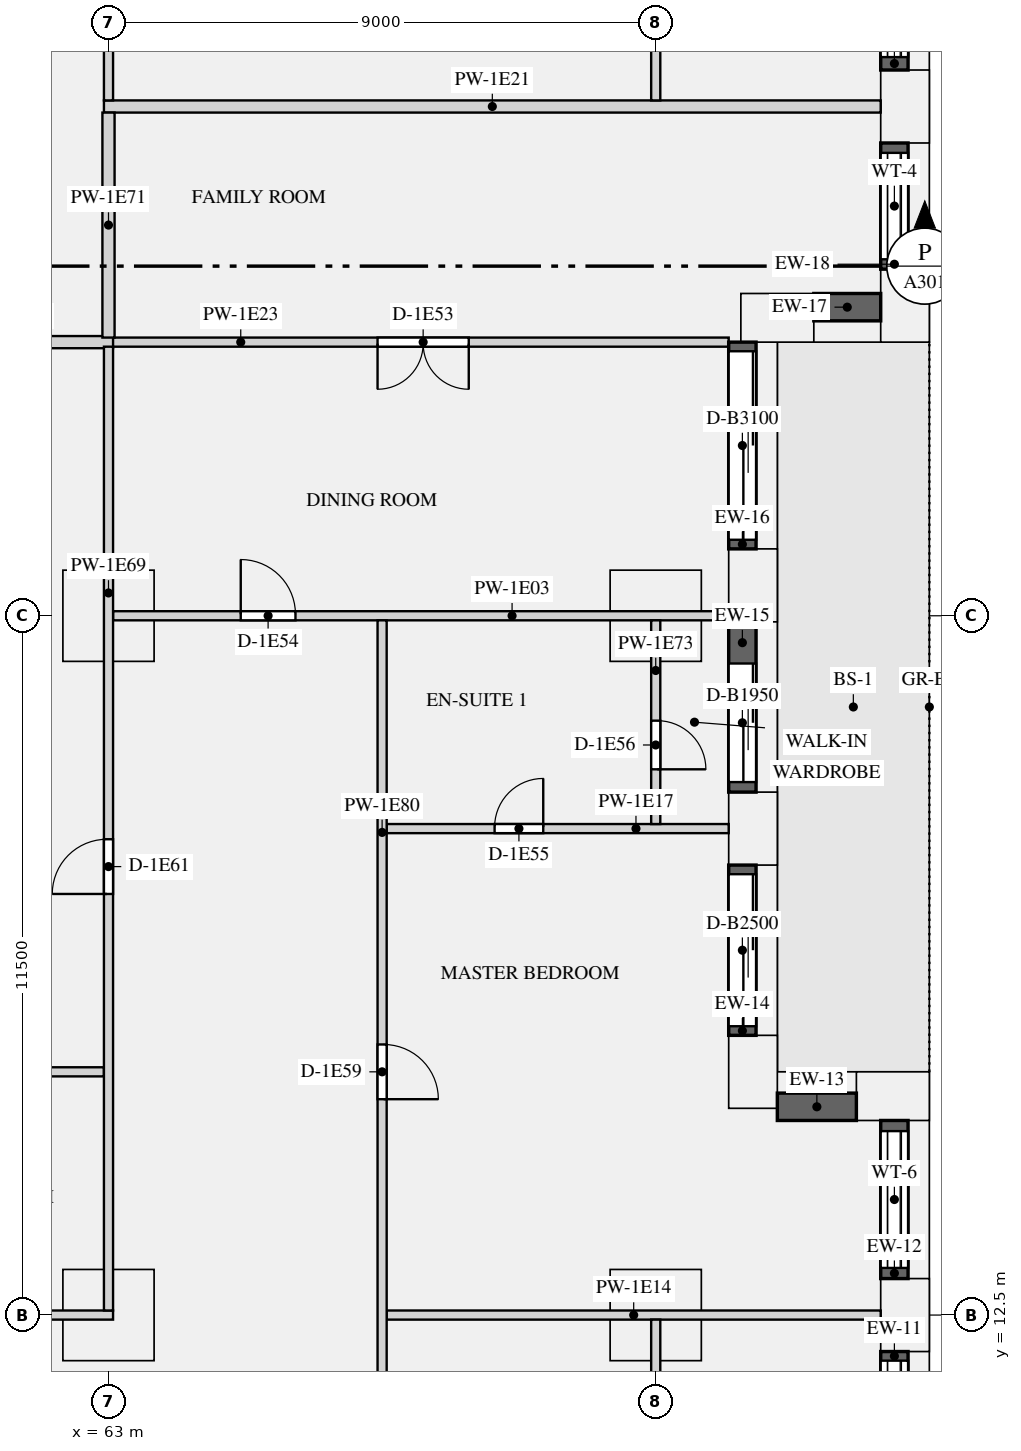
"""IFC4 building model, lengths in metres.
Left out: names, types, materials, properties, quantities, classifications, styles, units other than length and angle.
Written with IfcOpenShell. Run it as: python <this file> out.ifc"""

import sys

from ifc_helpers import new_model, si_unit, direction, frame, frame_2d, origin, origin_2d, place, context, subcontext, project, spatial, rectangle, extrude, element, fill, save


model = new_model("IFC4")
c1 = context("Model", 3, precision=1e-05, world=origin(), true_north=direction((0.0, 1.0)))
c2 = subcontext(c1, "Body", "Model", "MODEL_VIEW")
j1 = project(units=[si_unit("LENGTHUNIT", "METRE"), si_unit("PLANEANGLEUNIT", "RADIAN")], contexts=[c1])
p1 = place(None, origin())
s1 = spatial("IfcSite", under=j1, at=p1, CompositionType="ELEMENT")
p2 = place(p1, origin())
s2 = spatial("IfcBuilding", under=s1, at=p2, CompositionType="ELEMENT")
p3 = place(p2, frame((0.0, 0.0, 54.15)))
s3 = spatial("IfcBuildingStorey", under=s2, at=p3, CompositionType="ELEMENT", Elevation=54.15)
for number, where, z_axis, x_axis in (
    (1, (76.1, 12.5, 0.0), (0.0, 0.0, 1.0), (0.0, 1.0, 0.0)),
    (2, (75.9, 16.1, 0.0), (0.0, 0.0, 1.0), (-1.0, 0.0, 0.0)),
    (3, (73.6, 16.5, 0.0), (0.0, 0.0, 1.0), (0.0, 1.0, 0.0)),
    (4, (73.6, 20.5, 0.0), (0.0, 0.0, 1.0), (0.0, 1.0, 0.0)),
    (5, (73.6, 24.5, 0.0), (0.0, 0.0, 1.0), (0.0, 1.0, 0.0)),
    (6, (74.0, 28.9, 0.0), (0.0, 0.0, 1.0), (1.0, 0.0, 0.0)),
    (7, (76.1, 29.1, 0.0), (0.0, 0.0, 1.0), (0.0, 1.0, 0.0)),
    (8, (76.1, 32.375, 0.0), (0.0, 0.0, 1.0), (0.0, 1.0, 0.0)),
):
    element("IfcColumn", number, at=place(p3, frame(where, z_axis=z_axis, x_axis=x_axis)), inside=s3, PredefinedType="USERDEFINED", context=c2, shape_type="SweptSolid", body=[
        extrude(rectangle(XDim=1.2, YDim=0.8, at=origin_2d()), origin(), (0.0, 0.0, 1.0), 3.15),
    ])
for number, where, z_axis, x_axis in (
    (9, (63.0, 24.0, 0.0), (0.0, 0.0, 1.0), (1.0, 0.0, 0.0)),
    (10, (72.0, 24.0, 0.0), (0.0, 0.0, 1.0), (1.0, 0.0, 0.0)),
    (11, (63.0, 12.5, 0.0), (0.0, 0.0, 1.0), (1.0, 0.0, 0.0)),
    (12, (72.0, 12.5, 0.0), (0.0, 0.0, 1.0), (1.0, 0.0, 0.0)),
):
    element("IfcColumn", number, at=place(p3, frame(where, z_axis=z_axis, x_axis=x_axis)), inside=s3, PredefinedType="COLUMN", context=c2, shape_type="SweptSolid", body=[
        extrude(rectangle(XDim=1.5, YDim=1.5, at=origin_2d()), origin(), (0.0, 0.0, 1.0), 3.15),
    ])
p4 = place(p3, frame((75.925, 9.1, 0.9), z_axis=(0.0, 0.0, 1.0), x_axis=(0.0, 1.0, 0.0)))
e13 = element("IfcWall", 13, at=p4, inside=s3, PredefinedType="SOLIDWALL", context=c2, shape_type="SweptSolid", body=[
    extrude(rectangle(XDim=2.8, YDim=0.45, at=frame_2d((1.4, 0.0))), origin(), (0.0, 0.0, 1.0), 1.93),
])
p5 = place(p4, frame((0.15, 0.0, 0.15)))
e14 = element("IfcOpeningElement", 14, at=p5, cuts=e13, PredefinedType="OPENING", context=c2, shape_type="SweptSolid", body=[
    extrude(rectangle(XDim=2.5, YDim=1.5, at=frame_2d((1.25, 0.75))), frame((0.0, 0.235, 0.0), z_axis=(0.0, -1.0, 0.0), x_axis=(1.0, 0.0, 0.0)), (0.0, 0.0, 1.0), 0.47),
])
p6 = place(p3, frame((75.925, 13.1, 0.9), z_axis=(0.0, 0.0, 1.0), x_axis=(0.0, 1.0, 0.0)))
e15 = element("IfcWall", 15, at=p6, inside=s3, PredefinedType="SOLIDWALL", context=c2, shape_type="SweptSolid", body=[
    extrude(rectangle(XDim=2.6, YDim=0.45, at=frame_2d((1.3, 0.0))), origin(), (0.0, 0.0, 1.0), 1.93),
])
p7 = place(p6, frame((0.175, 0.0, 0.15)))
e16 = element("IfcOpeningElement", 16, at=p7, cuts=e15, PredefinedType="OPENING", context=c2, shape_type="SweptSolid", body=[
    extrude(rectangle(XDim=2.25, YDim=1.5, at=frame_2d((1.125, 0.75))), frame((0.0, 0.235, 0.0), z_axis=(0.0, -1.0, 0.0), x_axis=(1.0, 0.0, 0.0)), (0.0, 0.0, 1.0), 0.47),
])
p8 = place(p3, frame((75.3, 15.925, 0.9), z_axis=(0.0, 0.0, 1.0), x_axis=(-1.0, 0.0, 0.0)))
e17 = element("IfcWall", 17, at=p8, inside=s3, PredefinedType="SOLIDWALL", context=c2, shape_type="SweptSolid", body=[
    extrude(rectangle(XDim=1.3, YDim=0.45, at=frame_2d((0.65, 0.0))), origin(), (0.0, 0.0, 1.0), 1.93),
])
p9 = place(p3, frame((73.425, 17.1, 0.0), z_axis=(0.0, 0.0, 1.0), x_axis=(0.0, 1.0, 0.0)))
e18 = element("IfcWall", 18, at=p9, inside=s3, PredefinedType="SOLIDWALL", context=c2, shape_type="SweptSolid", body=[
    extrude(rectangle(XDim=2.8, YDim=0.45, at=frame_2d((1.4, 0.0))), origin(), (0.0, 0.0, 1.0), 2.83),
])
p10 = place(p9, frame((0.15, 0.0, 0.0)))
e19 = element("IfcOpeningElement", 19, at=p10, cuts=e18, PredefinedType="OPENING", context=c2, shape_type="SweptSolid", body=[
    extrude(rectangle(XDim=2.5, YDim=2.3, at=frame_2d((1.25, 1.15))), frame((0.0, 0.235, 0.0), z_axis=(0.0, -1.0, 0.0), x_axis=(1.0, 0.0, 0.0)), (0.0, 0.0, 1.0), 0.47),
])
p11 = place(p3, frame((73.425, 21.1, 0.0), z_axis=(0.0, 0.0, 1.0), x_axis=(0.0, 1.0, 0.0)))
e20 = element("IfcWall", 20, at=p11, inside=s3, PredefinedType="SOLIDWALL", context=c2, shape_type="SweptSolid", body=[
    extrude(rectangle(XDim=2.8, YDim=0.45, at=frame_2d((1.4, 0.0))), origin(), (0.0, 0.0, 1.0), 2.83),
])
p12 = place(p11, frame((0.165, 0.0, 0.0)))
e21 = element("IfcOpeningElement", 21, at=p12, cuts=e20, PredefinedType="OPENING", context=c2, shape_type="SweptSolid", body=[
    extrude(rectangle(XDim=1.95, YDim=2.3, at=frame_2d((0.975, 1.15))), frame((0.0, 0.235, 0.0), z_axis=(0.0, -1.0, 0.0), x_axis=(1.0, 0.0, 0.0)), (0.0, 0.0, 1.0), 0.47),
])
p13 = place(p3, frame((73.425, 25.1, 0.0), z_axis=(0.0, 0.0, 1.0), x_axis=(0.0, 1.0, 0.0)))
e22 = element("IfcWall", 22, at=p13, inside=s3, PredefinedType="SOLIDWALL", context=c2, shape_type="SweptSolid", body=[
    extrude(rectangle(XDim=3.4, YDim=0.45, at=frame_2d((1.7, 0.0))), origin(), (0.0, 0.0, 1.0), 2.83),
])
p14 = place(p13, frame((0.15, 0.0, 0.0)))
e23 = element("IfcOpeningElement", 23, at=p14, cuts=e22, PredefinedType="OPENING", context=c2, shape_type="SweptSolid", body=[
    extrude(rectangle(XDim=3.1, YDim=2.3, at=frame_2d((1.55, 1.15))), frame((0.0, 0.235, 0.0), z_axis=(0.0, -1.0, 0.0), x_axis=(1.0, 0.0, 0.0)), (0.0, 0.0, 1.0), 0.47),
])
p15 = place(p3, frame((74.6, 29.075, 0.9), z_axis=(0.0, 0.0, 1.0), x_axis=(1.0, 0.0, 0.0)))
e24 = element("IfcWall", 24, at=p15, inside=s3, PredefinedType="SOLIDWALL", context=c2, shape_type="SweptSolid", body=[
    extrude(rectangle(XDim=1.1, YDim=0.45, at=frame_2d((0.55, 0.0))), origin(), (0.0, 0.0, 1.0), 1.93),
])
p16 = place(p3, frame((75.925, 29.7, 0.9), z_axis=(0.0, 0.0, 1.0), x_axis=(0.0, 1.0, 0.0)))
e25 = element("IfcWall", 25, at=p16, inside=s3, PredefinedType="SOLIDWALL", context=c2, shape_type="SweptSolid", body=[
    extrude(rectangle(XDim=2.075, YDim=0.45, at=frame_2d((1.038, 0.0))), origin(), (0.0, 0.0, 1.0), 1.93),
])
p17 = place(p16, frame((0.163, 0.0, 0.15)))
e26 = element("IfcOpeningElement", 26, at=p17, cuts=e25, PredefinedType="OPENING", context=c2, shape_type="SweptSolid", body=[
    extrude(rectangle(XDim=1.75, YDim=1.5, at=frame_2d((0.875, 0.75))), frame((0.0, 0.235, 0.0), z_axis=(0.0, -1.0, 0.0), x_axis=(1.0, 0.0, 0.0)), (0.0, 0.0, 1.0), 0.47),
])
p18 = place(p3, frame((75.925, 32.975, 0.9), z_axis=(0.0, 0.0, 1.0), x_axis=(0.0, 1.0, 0.0)))
e27 = element("IfcWall", 27, at=p18, inside=s3, PredefinedType="SOLIDWALL", context=c2, shape_type="SweptSolid", body=[
    extrude(rectangle(XDim=2.675, YDim=0.45, at=frame_2d((1.337, 0.0))), origin(), (0.0, 0.0, 1.0), 1.93),
])
p19 = place(p18, frame((0.212, 0.0, 0.15)))
e28 = element("IfcOpeningElement", 28, at=p19, cuts=e27, PredefinedType="OPENING", context=c2, shape_type="SweptSolid", body=[
    extrude(rectangle(XDim=2.25, YDim=1.5, at=frame_2d((1.125, 0.75))), frame((0.0, 0.235, 0.0), z_axis=(0.0, -1.0, 0.0), x_axis=(1.0, 0.0, 0.0)), (0.0, 0.0, 1.0), 0.47),
])
p20 = place(p3, frame((63.075, 24.0, 0.0), z_axis=(0.0, 0.0, 1.0), x_axis=(1.0, 0.0, 0.0)))
e29 = element("IfcWall", 29, at=p20, inside=s3, PredefinedType="PARTITIONING", context=c2, shape_type="SweptSolid", body=[
    extrude(rectangle(XDim=10.125, YDim=0.15, at=frame_2d((5.062, 0.0))), origin(), (0.0, 0.0, 1.0), 2.83),
])
p21 = place(p20, frame((2.1, 0.0, 0.0)))
e30 = element("IfcOpeningElement", 30, at=p21, cuts=e29, PredefinedType="OPENING", context=c2, shape_type="SweptSolid", body=[
    extrude(rectangle(XDim=0.9, YDim=2.1, at=frame_2d((0.45, 1.05))), frame((0.0, 0.085, 0.0), z_axis=(0.0, -1.0, 0.0), x_axis=(1.0, 0.0, 0.0)), (0.0, 0.0, 1.0), 0.17),
])
p22 = place(p3, frame((58.425, 12.5, 0.0), z_axis=(0.0, 0.0, 1.0), x_axis=(1.0, 0.0, 0.0)))
e31 = element("IfcWall", 31, at=p22, inside=s3, PredefinedType="PARTITIONING", context=c2, shape_type="SweptSolid", body=[
    extrude(rectangle(XDim=4.65, YDim=0.15, at=frame_2d((2.325, 0.0))), origin(), (0.0, 0.0, 1.0), 2.83),
])
p23 = place(p3, frame((67.575, 12.5, 0.0), z_axis=(0.0, 0.0, 1.0), x_axis=(1.0, 0.0, 0.0)))
e32 = element("IfcWall", 32, at=p23, inside=s3, PredefinedType="PARTITIONING", context=c2, shape_type="SweptSolid", body=[
    extrude(rectangle(XDim=8.125, YDim=0.15, at=frame_2d((4.062, 0.0))), origin(), (0.0, 0.0, 1.0), 2.83),
])
p24 = place(p3, frame((67.575, 20.5, 0.0), z_axis=(0.0, 0.0, 1.0), x_axis=(1.0, 0.0, 0.0)))
e33 = element("IfcWall", 33, at=p24, inside=s3, PredefinedType="PARTITIONING", context=c2, shape_type="SweptSolid", body=[
    extrude(rectangle(XDim=5.625, YDim=0.15, at=frame_2d((2.812, 0.0))), origin(), (0.0, 0.0, 1.0), 2.83),
])
p25 = place(p24, frame((1.775, 0.0, 0.0)))
e34 = element("IfcOpeningElement", 34, at=p25, cuts=e33, PredefinedType="OPENING", context=c2, shape_type="SweptSolid", body=[
    extrude(rectangle(XDim=0.8, YDim=2.1, at=frame_2d((0.4, 1.05))), frame((0.0, 0.085, 0.0), z_axis=(0.0, -1.0, 0.0), x_axis=(1.0, 0.0, 0.0)), (0.0, 0.0, 1.0), 0.17),
])
p26 = place(p3, frame((58.575, 16.5, 0.0), z_axis=(0.0, 0.0, 1.0), x_axis=(1.0, 0.0, 0.0)))
e35 = element("IfcWall", 35, at=p26, inside=s3, PredefinedType="PARTITIONING", context=c2, shape_type="SweptSolid", body=[
    extrude(rectangle(XDim=4.35, YDim=0.15, at=frame_2d((2.175, 0.0))), origin(), (0.0, 0.0, 1.0), 2.83),
])
p27 = place(p3, frame((62.925, 32.375, 0.0), z_axis=(0.0, 0.0, 1.0), x_axis=(1.0, 0.0, 0.0)))
e36 = element("IfcWall", 36, at=p27, inside=s3, PredefinedType="PARTITIONING", context=c2, shape_type="SweptSolid", body=[
    extrude(rectangle(XDim=12.775, YDim=0.2, at=frame_2d((6.387, 0.0))), origin(), (0.0, 0.0, 1.0), 2.83),
])
p28 = place(p3, frame((62.925, 28.5, 0.0), z_axis=(0.0, 0.0, 1.0), x_axis=(1.0, 0.0, 0.0)))
e37 = element("IfcWall", 37, at=p28, inside=s3, PredefinedType="PARTITIONING", context=c2, shape_type="SweptSolid", body=[
    extrude(rectangle(XDim=10.275, YDim=0.15, at=frame_2d((5.137, 0.0))), origin(), (0.0, 0.0, 1.0), 2.83),
])
p29 = place(p28, frame((4.5, 0.0, 0.0)))
e38 = element("IfcOpeningElement", 38, at=p29, cuts=e37, PredefinedType="OPENING", context=c2, shape_type="SweptSolid", body=[
    extrude(rectangle(XDim=1.5, YDim=2.1, at=frame_2d((0.75, 1.05))), frame((0.0, 0.085, 0.0), z_axis=(0.0, -1.0, 0.0), x_axis=(1.0, 0.0, 0.0)), (0.0, 0.0, 1.0), 0.17),
])
p30 = place(p3, frame((59.8, 28.5, 0.0), z_axis=(0.0, 0.0, 1.0), x_axis=(1.0, 0.0, 0.0)))
e39 = element("IfcWall", 39, at=p30, inside=s3, PredefinedType="PARTITIONING", context=c2, shape_type="SweptSolid", body=[
    extrude(rectangle(XDim=3.275, YDim=0.2, at=frame_2d((1.637, 0.0))), origin(), (0.0, 0.0, 1.0), 2.83),
])
p31 = place(p3, frame((63.0, 12.575, 0.0), z_axis=(0.0, 0.0, 1.0), x_axis=(0.0, 1.0, 0.0)))
e40 = element("IfcWall", 40, at=p31, inside=s3, PredefinedType="PARTITIONING", context=c2, shape_type="SweptSolid", body=[
    extrude(rectangle(XDim=15.85, YDim=0.15, at=frame_2d((7.925, 0.0))), origin(), (0.0, 0.0, 1.0), 2.83),
])
p32 = place(p31, frame((6.85, 0.0, 0.0)))
e41 = element("IfcOpeningElement", 41, at=p32, cuts=e40, PredefinedType="OPENING", context=c2, shape_type="SweptSolid", body=[
    extrude(rectangle(XDim=0.9, YDim=2.1, at=frame_2d((0.45, 1.05))), frame((0.0, 0.085, 0.0), z_axis=(0.0, -1.0, 0.0), x_axis=(1.0, 0.0, 0.0)), (0.0, 0.0, 1.0), 0.17),
])
p33 = place(p3, frame((63.0, 32.475, 0.0), z_axis=(0.0, 0.0, 1.0), x_axis=(0.0, 1.0, 0.0)))
e42 = element("IfcWall", 42, at=p33, inside=s3, PredefinedType="PARTITIONING", context=c2, shape_type="SweptSolid", body=[
    extrude(rectangle(XDim=7.575, YDim=0.15, at=frame_2d((3.788, 0.0))), origin(), (0.0, 0.0, 1.0), 2.83),
])
p34 = place(p3, frame((63.0, 28.575, 0.0), z_axis=(0.0, 0.0, 1.0), x_axis=(0.0, 1.0, 0.0)))
e43 = element("IfcWall", 43, at=p34, inside=s3, PredefinedType="PARTITIONING", context=c2, shape_type="SweptSolid", body=[
    extrude(rectangle(XDim=3.7, YDim=0.2, at=frame_2d((1.85, 0.0))), origin(), (0.0, 0.0, 1.0), 2.83),
])
p35 = place(p3, frame((72.0, 8.575, 0.0), z_axis=(0.0, 0.0, 1.0), x_axis=(0.0, 1.0, 0.0)))
e44 = element("IfcWall", 44, at=p35, inside=s3, PredefinedType="PARTITIONING", context=c2, shape_type="SweptSolid", body=[
    extrude(rectangle(XDim=3.85, YDim=0.15, at=frame_2d((1.925, 0.0))), origin(), (0.0, 0.0, 1.0), 2.83),
])
p36 = place(p3, frame((72.0, 20.575, 0.0), z_axis=(0.0, 0.0, 1.0), x_axis=(0.0, 1.0, 0.0)))
e45 = element("IfcWall", 45, at=p36, inside=s3, PredefinedType="PARTITIONING", context=c2, shape_type="SweptSolid", body=[
    extrude(rectangle(XDim=3.35, YDim=0.15, at=frame_2d((1.675, 0.0))), origin(), (0.0, 0.0, 1.0), 2.83),
])
p37 = place(p36, frame((0.9, 0.0, 0.0)))
e46 = element("IfcOpeningElement", 46, at=p37, cuts=e45, PredefinedType="OPENING", context=c2, shape_type="SweptSolid", body=[
    extrude(rectangle(XDim=0.8, YDim=2.1, at=frame_2d((0.4, 1.05))), frame((0.0, 0.085, 0.0), z_axis=(0.0, -1.0, 0.0), x_axis=(1.0, 0.0, 0.0)), (0.0, 0.0, 1.0), 0.17),
])
p38 = place(p3, frame((72.0, 32.475, 0.0), z_axis=(0.0, 0.0, 1.0), x_axis=(0.0, 1.0, 0.0)))
e47 = element("IfcWall", 47, at=p38, inside=s3, PredefinedType="PARTITIONING", context=c2, shape_type="SweptSolid", body=[
    extrude(rectangle(XDim=7.575, YDim=0.15, at=frame_2d((3.788, 0.0))), origin(), (0.0, 0.0, 1.0), 2.83),
])
p39 = place(p38, frame((4.963, 0.0, 0.0)))
e48 = element("IfcOpeningElement", 48, at=p39, cuts=e47, PredefinedType="OPENING", context=c2, shape_type="SweptSolid", body=[
    extrude(rectangle(XDim=1.5, YDim=2.1, at=frame_2d((0.75, 1.05))), frame((0.0, 0.085, 0.0), z_axis=(0.0, -1.0, 0.0), x_axis=(1.0, 0.0, 0.0)), (0.0, 0.0, 1.0), 0.17),
])
p40 = place(p3, frame((67.5, 8.575, 0.0), z_axis=(0.0, 0.0, 1.0), x_axis=(0.0, 1.0, 0.0)))
e49 = element("IfcWall", 49, at=p40, inside=s3, PredefinedType="PARTITIONING", context=c2, shape_type="SweptSolid", body=[
    extrude(rectangle(XDim=15.35, YDim=0.15, at=frame_2d((7.675, 0.0))), origin(), (0.0, 0.0, 1.0), 2.83),
])
p41 = place(p40, frame((7.475, 0.0, 0.0)))
e50 = element("IfcOpeningElement", 50, at=p41, cuts=e49, PredefinedType="OPENING", context=c2, shape_type="SweptSolid", body=[
    extrude(rectangle(XDim=0.9, YDim=2.1, at=frame_2d((0.45, 1.05))), frame((0.0, 0.085, 0.0), z_axis=(0.0, -1.0, 0.0), x_axis=(1.0, 0.0, 0.0)), (0.0, 0.0, 1.0), 0.17),
])
p42 = place(p40, frame((1.475, 0.0, 0.0)))
e51 = element("IfcOpeningElement", 51, at=p42, cuts=e49, PredefinedType="OPENING", context=c2, shape_type="SweptSolid", body=[
    extrude(rectangle(XDim=0.9, YDim=2.1, at=frame_2d((0.45, 1.05))), frame((0.0, 0.085, 0.0), z_axis=(0.0, -1.0, 0.0), x_axis=(1.0, 0.0, 0.0)), (0.0, 0.0, 1.0), 0.17),
])
p43 = place(p5, origin())
e52 = element("IfcWindow", 52, at=p43, inside=s3, PartitioningType="SINGLE_PANEL", PredefinedType="WINDOW", context=c2, shape_type="SweptSolid", body=[
    extrude(rectangle(XDim=2.5, YDim=1.5, at=frame_2d((1.25, 0.75))), frame((0.0, -0.065, 0.0), z_axis=(0.0, -1.0, 0.0), x_axis=(1.0, 0.0, 0.0)), (0.0, 0.0, 1.0), 0.06),
])
fill(e14, e52)
p44 = place(p7, origin())
e53 = element("IfcWindow", 53, at=p44, inside=s3, PartitioningType="SINGLE_PANEL", PredefinedType="WINDOW", context=c2, shape_type="SweptSolid", body=[
    extrude(rectangle(XDim=2.25, YDim=1.5, at=frame_2d((1.125, 0.75))), frame((0.0, -0.065, 0.0), z_axis=(0.0, -1.0, 0.0), x_axis=(1.0, 0.0, 0.0)), (0.0, 0.0, 1.0), 0.06),
])
fill(e16, e53)
p45 = place(p10, origin())
e54 = element("IfcDoor", 54, at=p45, inside=s3, OperationType="SLIDING_TO_LEFT", PredefinedType="DOOR", context=c2, shape_type="SweptSolid", body=[
    extrude(rectangle(XDim=2.5, YDim=2.3, at=frame_2d((1.25, 1.15))), frame((0.0, -0.07, 0.0), z_axis=(0.0, -1.0, 0.0), x_axis=(1.0, 0.0, 0.0)), (0.0, 0.0, 1.0), 0.05),
])
fill(e19, e54)
p46 = place(p12, origin())
e55 = element("IfcDoor", 55, at=p46, inside=s3, OperationType="SLIDING_TO_LEFT", PredefinedType="DOOR", context=c2, shape_type="SweptSolid", body=[
    extrude(rectangle(XDim=1.95, YDim=2.3, at=frame_2d((0.975, 1.15))), frame((0.0, -0.07, 0.0), z_axis=(0.0, -1.0, 0.0), x_axis=(1.0, 0.0, 0.0)), (0.0, 0.0, 1.0), 0.05),
])
fill(e21, e55)
p47 = place(p14, origin())
e56 = element("IfcDoor", 56, at=p47, inside=s3, OperationType="SLIDING_TO_LEFT", PredefinedType="DOOR", context=c2, shape_type="SweptSolid", body=[
    extrude(rectangle(XDim=3.1, YDim=2.3, at=frame_2d((1.55, 1.15))), frame((0.0, -0.07, 0.0), z_axis=(0.0, -1.0, 0.0), x_axis=(1.0, 0.0, 0.0)), (0.0, 0.0, 1.0), 0.05),
])
fill(e23, e56)
p48 = place(p17, origin())
e57 = element("IfcWindow", 57, at=p48, inside=s3, PartitioningType="SINGLE_PANEL", PredefinedType="WINDOW", context=c2, shape_type="SweptSolid", body=[
    extrude(rectangle(XDim=1.75, YDim=1.5, at=frame_2d((0.875, 0.75))), frame((0.0, -0.065, 0.0), z_axis=(0.0, -1.0, 0.0), x_axis=(1.0, 0.0, 0.0)), (0.0, 0.0, 1.0), 0.06),
])
fill(e26, e57)
p49 = place(p19, origin())
e58 = element("IfcWindow", 58, at=p49, inside=s3, PartitioningType="SINGLE_PANEL", PredefinedType="WINDOW", context=c2, shape_type="SweptSolid", body=[
    extrude(rectangle(XDim=2.25, YDim=1.5, at=frame_2d((1.125, 0.75))), frame((0.0, -0.065, 0.0), z_axis=(0.0, -1.0, 0.0), x_axis=(1.0, 0.0, 0.0)), (0.0, 0.0, 1.0), 0.06),
])
fill(e28, e58)
p50 = place(p29, frame((1.5, 0.0, 0.0), z_axis=(0.0, 0.0, 1.0), x_axis=(-1.0, 0.0, 0.0)))
e59 = element("IfcDoor", 59, at=p50, inside=s3, OperationType="DOUBLE_DOOR_SINGLE_SWING", PredefinedType="DOOR", context=c2, shape_type="SweptSolid", body=[
    extrude(rectangle(XDim=1.5, YDim=2.1, at=frame_2d((0.75, 1.05))), frame((0.0, 0.025, 0.0), z_axis=(0.0, -1.0, 0.0), x_axis=(1.0, 0.0, 0.0)), (0.0, 0.0, 1.0), 0.05),
])
fill(e38, e59)
p51 = place(p21, origin())
e60 = element("IfcDoor", 60, at=p51, inside=s3, OperationType="SINGLE_SWING_LEFT", PredefinedType="DOOR", context=c2, shape_type="SweptSolid", body=[
    extrude(rectangle(XDim=0.9, YDim=2.1, at=frame_2d((0.45, 1.05))), frame((0.0, 0.025, 0.0), z_axis=(0.0, -1.0, 0.0), x_axis=(1.0, 0.0, 0.0)), (0.0, 0.0, 1.0), 0.05),
])
fill(e30, e60)
p52 = place(p25, origin())
e61 = element("IfcDoor", 61, at=p52, inside=s3, OperationType="SINGLE_SWING_RIGHT", PredefinedType="DOOR", context=c2, shape_type="SweptSolid", body=[
    extrude(rectangle(XDim=0.8, YDim=2.1, at=frame_2d((0.4, 1.05))), frame((0.0, 0.025, 0.0), z_axis=(0.0, -1.0, 0.0), x_axis=(1.0, 0.0, 0.0)), (0.0, 0.0, 1.0), 0.05),
])
fill(e34, e61)
p53 = place(p37, frame((0.8, 0.0, 0.0), z_axis=(0.0, 0.0, 1.0), x_axis=(-1.0, 0.0, 0.0)))
e62 = element("IfcDoor", 62, at=p53, inside=s3, OperationType="SINGLE_SWING_RIGHT", PredefinedType="DOOR", context=c2, shape_type="SweptSolid", body=[
    extrude(rectangle(XDim=0.8, YDim=2.1, at=frame_2d((0.4, 1.05))), frame((0.0, 0.025, 0.0), z_axis=(0.0, -1.0, 0.0), x_axis=(1.0, 0.0, 0.0)), (0.0, 0.0, 1.0), 0.05),
])
fill(e46, e62)
p54 = place(p41, frame((0.9, 0.0, 0.0), z_axis=(0.0, 0.0, 1.0), x_axis=(-1.0, 0.0, 0.0)))
e63 = element("IfcDoor", 63, at=p54, inside=s3, OperationType="SINGLE_SWING_RIGHT", PredefinedType="DOOR", context=c2, shape_type="SweptSolid", body=[
    extrude(rectangle(XDim=0.9, YDim=2.1, at=frame_2d((0.45, 1.05))), frame((0.0, 0.025, 0.0), z_axis=(0.0, -1.0, 0.0), x_axis=(1.0, 0.0, 0.0)), (0.0, 0.0, 1.0), 0.05),
])
fill(e50, e63)
p55 = place(p32, origin())
e64 = element("IfcDoor", 64, at=p55, inside=s3, OperationType="SINGLE_SWING_LEFT", PredefinedType="DOOR", context=c2, shape_type="SweptSolid", body=[
    extrude(rectangle(XDim=0.9, YDim=2.1, at=frame_2d((0.45, 1.05))), frame((0.0, 0.025, 0.0), z_axis=(0.0, -1.0, 0.0), x_axis=(1.0, 0.0, 0.0)), (0.0, 0.0, 1.0), 0.05),
])
fill(e41, e64)
save(model, sys.argv[1])
